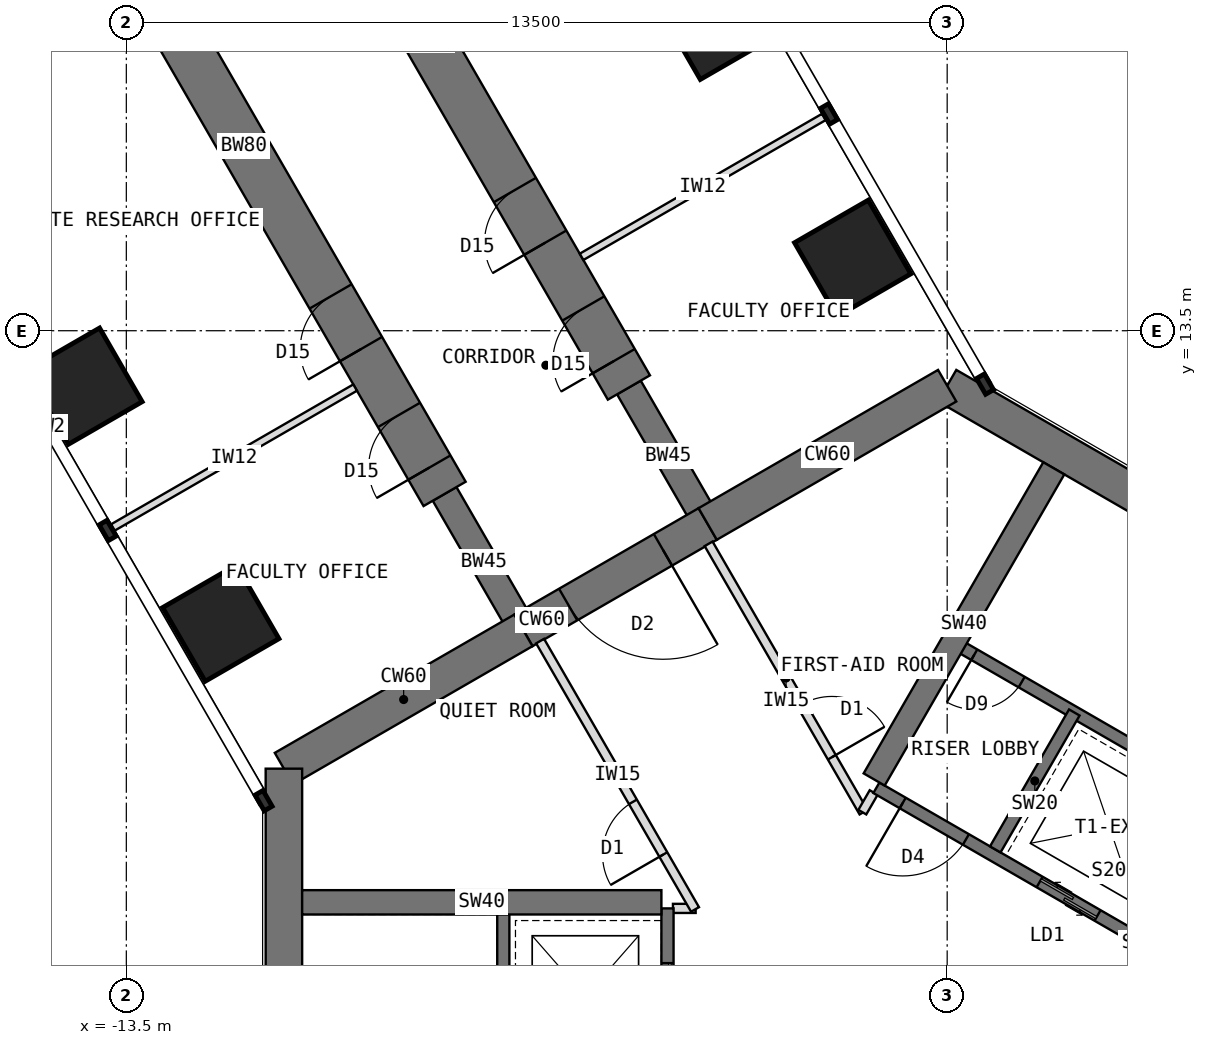
"""IFC4 building model, lengths in metres.
Left out: names, types, materials, properties, quantities, classifications, styles, units other than length and angle.
Written with IfcOpenShell. Run it as: python <this file> out.ifc"""

import sys

from ifc_helpers import new_model, si_unit, direction, frame, frame_2d, origin, origin_2d, place, context, subcontext, project, spatial, rectangle, extrude, element, fill, save


model = new_model("IFC4")
c1 = context("Model", 3, precision=1e-05, world=origin(), true_north=direction((0.0, 1.0)))
c2 = subcontext(c1, "Body", "Model", "MODEL_VIEW")
j1 = project(units=[si_unit("LENGTHUNIT", "METRE"), si_unit("PLANEANGLEUNIT", "RADIAN")], contexts=[c1])
p1 = place(None, origin())
s1 = spatial("IfcSite", under=j1, at=p1, CompositionType="ELEMENT")
p2 = place(p1, origin())
s2 = spatial("IfcBuilding", under=s1, at=p2, CompositionType="ELEMENT")
p3 = place(p2, frame((0.0, 0.0, 97.5)))
s3 = spatial("IfcBuildingStorey", under=s2, at=p3, CompositionType="ELEMENT", Elevation=97.5)
p4 = place(p3, frame((10.908, 6.298, 0.0), z_axis=(0.0, 0.0, 1.0), x_axis=(-0.866021940709, 0.500005998175, 0.0)))
e1 = element("IfcWall", 1, at=p4, inside=s3, PredefinedType="SHEAR", context=c2, shape_type="SweptSolid", body=[
    extrude(rectangle(XDim=12.596, YDim=0.6, at=frame_2d((6.298, 0.0))), origin(), (0.0, 0.0, 1.0), 4.0),
])
p5 = place(p3, frame((0.0, 12.596, 0.0), z_axis=(0.0, 0.0, 1.0), x_axis=(-0.866011268655, -0.500024481964, 0.0)))
e2 = element("IfcWall", 2, at=p5, inside=s3, PredefinedType="SHEAR", context=c2, shape_type="SweptSolid", body=[
    extrude(rectangle(XDim=4.548, YDim=0.6, at=frame_2d((2.274, 0.0))), origin(), (0.0, 0.0, 1.0), 4.0),
])
p6 = place(p3, frame((-3.939, 10.322, 0.0), z_axis=(0.0, 0.0, 1.0), x_axis=(-0.866019471182, -0.500010275428, 0.0)))
e3 = element("IfcWall", 3, at=p6, inside=s3, PredefinedType="SHEAR", context=c2, shape_type="SweptSolid", body=[
    extrude(rectangle(XDim=3.5, YDim=0.6, at=frame_2d((1.75, 0.0))), origin(), (0.0, 0.0, 1.0), 4.0),
])
p7 = place(p6, frame((0.85, 0.0, 0.0)))
e4 = element("IfcOpeningElement", 4, at=p7, cuts=e3, PredefinedType="OPENING", context=c2, shape_type="SweptSolid", body=[
    extrude(rectangle(XDim=1.8, YDim=2.1, at=frame_2d((0.9, 1.05))), frame((0.0, 0.31, 0.0), z_axis=(0.0, -1.0, 0.0), x_axis=(1.0, 0.0, 0.0)), (0.0, 0.0, 1.0), 0.62),
])
p8 = place(p3, frame((-6.97, 8.572, 0.0), z_axis=(0.0, 0.0, 1.0), x_axis=(-0.866034513004, -0.499984222037, 0.0)))
e5 = element("IfcWall", 5, at=p8, inside=s3, PredefinedType="SHEAR", context=c2, shape_type="SweptSolid", body=[
    extrude(rectangle(XDim=4.548, YDim=0.6, at=frame_2d((2.274, 0.0))), origin(), (0.0, 0.0, 1.0), 4.0),
])
p9 = place(p3, frame((-10.908, 6.298, 0.0), z_axis=(0.0, 0.0, 1.0), x_axis=(0.0, -1.0, 0.0)))
e6 = element("IfcWall", 6, at=p9, inside=s3, PredefinedType="SHEAR", context=c2, shape_type="SweptSolid", body=[
    extrude(rectangle(XDim=12.596, YDim=0.6, at=frame_2d((6.298, 0.0))), origin(), (0.0, 0.0, 1.0), 4.0),
])
p10 = place(p3, frame((-6.97, 8.572, 0.0), z_axis=(0.0, 0.0, 1.0), x_axis=(-0.499988811324, 0.866031863473, 0.0)))
e7 = element("IfcWall", 7, at=p10, inside=s3, PredefinedType="SHEAR", context=c2, shape_type="SweptSolid", body=[
    extrude(rectangle(XDim=2.592, YDim=0.45, at=frame_2d((1.296, 0.0))), origin(), (0.0, 0.0, 1.0), 4.0),
])
p11 = place(p3, frame((-8.266, 10.816, 0.0), z_axis=(0.0, 0.0, 1.0), x_axis=(-0.499996231654, 0.866027579429, 0.0)))
e8 = element("IfcWall", 8, at=p11, inside=s3, PredefinedType="SHEAR", context=c2, shape_type="SweptSolid", body=[
    extrude(rectangle(XDim=13.2, YDim=0.8, at=frame_2d((6.6, 0.0))), origin(), (0.0, 0.0, 1.0), 4.0),
])
p12 = place(p11, frame((0.5, 0.0, 0.0)))
e9 = element("IfcOpeningElement", 9, at=p12, cuts=e8, PredefinedType="OPENING", context=c2, shape_type="SweptSolid", body=[
    extrude(rectangle(XDim=1.0, YDim=2.1, at=frame_2d((0.5, 1.05))), frame((0.0, 0.41, 0.0), z_axis=(0.0, -1.0, 0.0), x_axis=(1.0, 0.0, 0.0)), (0.0, 0.0, 1.0), 0.82),
])
p13 = place(p11, frame((2.75, 0.0, 0.0)))
e10 = element("IfcOpeningElement", 10, at=p13, cuts=e8, PredefinedType="OPENING", context=c2, shape_type="SweptSolid", body=[
    extrude(rectangle(XDim=1.0, YDim=2.1, at=frame_2d((0.5, 1.05))), frame((0.0, 0.41, 0.0), z_axis=(0.0, -1.0, 0.0), x_axis=(1.0, 0.0, 0.0)), (0.0, 0.0, 1.0), 0.82),
])
p14 = place(p3, frame((-3.939, 10.322, 0.0), z_axis=(0.0, 0.0, 1.0), x_axis=(-0.499918158782, 0.866072649678, 0.0)))
e11 = element("IfcWall", 11, at=p14, inside=s3, PredefinedType="SHEAR", context=c2, shape_type="SweptSolid", body=[
    extrude(rectangle(XDim=2.592, YDim=0.45, at=frame_2d((1.296, 0.0))), origin(), (0.0, 0.0, 1.0), 4.0),
])
p15 = place(p3, frame((-5.234, 12.566, 0.0), z_axis=(0.0, 0.0, 1.0), x_axis=(-0.500010103361, 0.866019570528, 0.0)))
e12 = element("IfcWall", 12, at=p15, inside=s3, PredefinedType="SHEAR", context=c2, shape_type="SweptSolid", body=[
    extrude(rectangle(XDim=13.2, YDim=0.8, at=frame_2d((6.6, 0.0))), origin(), (0.0, 0.0, 1.0), 4.0),
])
p16 = place(p15, frame((0.5, 0.0, 0.0)))
e13 = element("IfcOpeningElement", 13, at=p16, cuts=e12, PredefinedType="OPENING", context=c2, shape_type="SweptSolid", body=[
    extrude(rectangle(XDim=1.0, YDim=2.1, at=frame_2d((0.5, 1.05))), frame((0.0, 0.41, 0.0), z_axis=(0.0, -1.0, 0.0), x_axis=(1.0, 0.0, 0.0)), (0.0, 0.0, 1.0), 0.82),
])
p17 = place(p15, frame((2.75, 0.0, 0.0)))
e14 = element("IfcOpeningElement", 14, at=p17, cuts=e12, PredefinedType="OPENING", context=c2, shape_type="SweptSolid", body=[
    extrude(rectangle(XDim=1.0, YDim=2.1, at=frame_2d((0.5, 1.05))), frame((0.0, 0.41, 0.0), z_axis=(0.0, -1.0, 0.0), x_axis=(1.0, 0.0, 0.0)), (0.0, 0.0, 1.0), 0.82),
])
for number, where, z_axis, x_axis in (
    (15, (-11.946, 8.691, 0.0), (0.0, 0.0, 1.0), (0.866, 0.5, 0.0)),
    (16, (-1.554, 14.691, 0.0), (0.0, 0.0, 1.0), (0.866, 0.5, 0.0)),
    (17, (-14.196, 12.588, 0.0), (0.0, 0.0, 1.0), (0.866, 0.5, 0.0)),
    (18, (-3.804, 18.588, 0.0), (0.0, 0.0, 1.0), (0.866, 0.5, 0.0)),
):
    element("IfcColumn", number, at=place(p3, frame(where, z_axis=z_axis, x_axis=x_axis)), inside=s3, PredefinedType="COLUMN", context=c2, shape_type="SweptSolid", body=[
        extrude(rectangle(XDim=1.4, YDim=1.4, at=origin_2d()), origin(), (0.0, 0.0, 1.0), 4.0),
    ])
p18 = place(p3, frame((5.764, 1.984, 0.0), z_axis=(0.0, 0.0, 1.0), x_axis=(-0.866026010844, 0.49999894854, 0.0)))
e19 = element("IfcWall", 19, at=p18, inside=s3, PredefinedType="SHEAR", context=c2, shape_type="SweptSolid", body=[
    extrude(rectangle(XDim=8.0, YDim=0.2, at=frame_2d((4.0, 0.0))), origin(), (0.0, 0.0, 1.0), 4.0),
])
p19 = place(p18, frame((6.3, 0.0, 0.0)))
e20 = element("IfcOpeningElement", 20, at=p19, cuts=e19, PredefinedType="OPENING", context=c2, shape_type="SweptSolid", body=[
    extrude(rectangle(XDim=1.2, YDim=2.1, at=frame_2d((0.6, 1.05))), frame((0.0, 0.11, 0.0), z_axis=(0.0, -1.0, 0.0), x_axis=(1.0, 0.0, 0.0)), (0.0, 0.0, 1.0), 0.22),
])
p20 = place(p18, frame((0.9, 0.0, 0.0)))
e21 = element("IfcOpeningElement", 21, at=p20, cuts=e19, PredefinedType="OPENING", context=c2, shape_type="SweptSolid", body=[
    extrude(rectangle(XDim=1.1, YDim=2.2, at=frame_2d((0.55, 1.1))), frame((0.0, 0.11, 0.0), z_axis=(0.0, -1.0, 0.0), x_axis=(1.0, 0.0, 0.0)), (0.0, 0.0, 1.0), 0.22),
])
p21 = place(p18, frame((3.8, 0.0, 0.0)))
e22 = element("IfcOpeningElement", 22, at=p21, cuts=e19, PredefinedType="OPENING", context=c2, shape_type="SweptSolid", body=[
    extrude(rectangle(XDim=1.1, YDim=2.2, at=frame_2d((0.55, 1.1))), frame((0.0, 0.11, 0.0), z_axis=(0.0, -1.0, 0.0), x_axis=(1.0, 0.0, 0.0)), (0.0, 0.0, 1.0), 0.22),
])
p22 = place(p3, frame((0.791, 4.97, 0.0), z_axis=(0.0, 0.0, 1.0), x_axis=(0.499936506574, 0.866062058628, 0.0)))
e23 = element("IfcWall", 23, at=p22, inside=s3, PredefinedType="SHEAR", context=c2, shape_type="SweptSolid", body=[
    extrude(rectangle(XDim=2.6, YDim=0.2, at=frame_2d((1.3, 0.0))), origin(), (0.0, 0.0, 1.0), 4.0),
])
p23 = place(p3, frame((7.114, 4.322, 0.0), z_axis=(0.0, 0.0, 1.0), x_axis=(-0.866026010844, 0.49999894854, 0.0)))
e24 = element("IfcWall", 24, at=p23, inside=s3, PredefinedType="SHEAR", context=c2, shape_type="SweptSolid", body=[
    extrude(rectangle(XDim=8.0, YDim=0.2, at=frame_2d((4.0, 0.0))), origin(), (0.0, 0.0, 1.0), 4.0),
])
p24 = place(p23, frame((6.8, 0.0, 0.0)))
e25 = element("IfcOpeningElement", 25, at=p24, cuts=e24, PredefinedType="OPENING", context=c2, shape_type="SweptSolid", body=[
    extrude(rectangle(XDim=0.9, YDim=2.1, at=frame_2d((0.45, 1.05))), frame((0.0, 0.11, 0.0), z_axis=(0.0, -1.0, 0.0), x_axis=(1.0, 0.0, 0.0)), (0.0, 0.0, 1.0), 0.22),
])
p25 = place(p3, frame((-1.201, 6.12, 0.0), z_axis=(0.0, 0.0, 1.0), x_axis=(0.49999668571, 0.866027317282, 0.0)))
e26 = element("IfcWall", 26, at=p25, inside=s3, PredefinedType="SHEAR", context=c2, shape_type="SweptSolid", body=[
    extrude(rectangle(XDim=5.908, YDim=0.4, at=frame_2d((2.954, 0.0))), origin(), (0.0, 0.0, 1.0), 4.0),
])
p26 = place(p3, frame((-4.6, 4.0, 0.0), z_axis=(0.0, 0.0, 1.0), x_axis=(0.0, -1.0, 0.0)))
e27 = element("IfcWall", 27, at=p26, inside=s3, PredefinedType="SHEAR", context=c2, shape_type="SweptSolid", body=[
    extrude(rectangle(XDim=8.0, YDim=0.2, at=frame_2d((4.0, 0.0))), origin(), (0.0, 0.0, 1.0), 4.0),
])
p27 = place(p26, frame((6.3, 0.0, 0.0)))
e28 = element("IfcOpeningElement", 28, at=p27, cuts=e27, PredefinedType="OPENING", context=c2, shape_type="SweptSolid", body=[
    extrude(rectangle(XDim=1.2, YDim=2.1, at=frame_2d((0.6, 1.05))), frame((0.0, 0.11, 0.0), z_axis=(0.0, -1.0, 0.0), x_axis=(1.0, 0.0, 0.0)), (0.0, 0.0, 1.0), 0.22),
])
p28 = place(p26, frame((0.9, 0.0, 0.0)))
e29 = element("IfcOpeningElement", 29, at=p28, cuts=e27, PredefinedType="OPENING", context=c2, shape_type="SweptSolid", body=[
    extrude(rectangle(XDim=1.1, YDim=2.2, at=frame_2d((0.55, 1.1))), frame((0.0, 0.11, 0.0), z_axis=(0.0, -1.0, 0.0), x_axis=(1.0, 0.0, 0.0)), (0.0, 0.0, 1.0), 0.22),
])
p29 = place(p3, frame((-7.3, 4.0, 0.0), z_axis=(0.0, 0.0, 1.0), x_axis=(0.0, -1.0, 0.0)))
e30 = element("IfcWall", 30, at=p29, inside=s3, PredefinedType="SHEAR", context=c2, shape_type="SweptSolid", body=[
    extrude(rectangle(XDim=8.0, YDim=0.2, at=frame_2d((4.0, 0.0))), origin(), (0.0, 0.0, 1.0), 4.0),
])
p30 = place(p29, frame((6.7, 0.0, 0.0)))
e31 = element("IfcOpeningElement", 31, at=p30, cuts=e30, PredefinedType="OPENING", context=c2, shape_type="SweptSolid", body=[
    extrude(rectangle(XDim=1.1, YDim=2.1, at=frame_2d((0.55, 1.05))), frame((0.0, 0.11, 0.0), z_axis=(0.0, -1.0, 0.0), x_axis=(1.0, 0.0, 0.0)), (0.0, 0.0, 1.0), 0.22),
])
p31 = place(p3, frame((-4.7, 4.1, 0.0), z_axis=(0.0, 0.0, 1.0), x_axis=(-1.0, 0.0, 0.0)))
e32 = element("IfcWall", 32, at=p31, inside=s3, PredefinedType="SHEAR", context=c2, shape_type="SweptSolid", body=[
    extrude(rectangle(XDim=5.908, YDim=0.4, at=frame_2d((2.954, 0.0))), origin(), (0.0, 0.0, 1.0), 4.0),
])
for number, where, z_axis, x_axis in (
    (33, (-9.737, 12.565, 0.0), (0.0, 0.0, 1.0), (-0.866, -0.5, 0.0)),
    (34, (-6.013, 14.715, 0.0), (0.0, 0.0, 1.0), (0.866, 0.5, 0.0)),
):
    element("IfcWall", number, at=place(p3, frame(where, z_axis=z_axis, x_axis=x_axis)), inside=s3, PredefinedType="PARTITIONING", context=c2, shape_type="SweptSolid", body=[
        extrude(rectangle(XDim=4.6, YDim=0.12, at=frame_2d((2.3, 0.0))), origin(), (0.0, 0.0, 1.0), 3.8),
    ])
p32 = place(p3, frame((-4.51, 4.0, 0.0), z_axis=(0.0, 0.0, 1.0), x_axis=(1.0, 0.0, 0.0)))
e35 = element("IfcWall", 35, at=p32, inside=s3, PredefinedType="PARTITIONING", context=c2, shape_type="SweptSolid", body=[
    extrude(rectangle(XDim=0.373, YDim=0.15, at=frame_2d((0.187, 0.0))), origin(), (0.0, 0.0, 1.0), 3.8),
])
p33 = place(p3, frame((-4.147, 3.983, 0.0), z_axis=(0.0, 0.0, 1.0), x_axis=(-0.499993407537, 0.866029209911, 0.0)))
e36 = element("IfcWall", 36, at=p33, inside=s3, PredefinedType="PARTITIONING", context=c2, shape_type="SweptSolid", body=[
    extrude(rectangle(XDim=5.096, YDim=0.15, at=frame_2d((2.548, 0.0))), origin(), (0.0, 0.0, 1.0), 3.8),
])
p34 = place(p33, frame((1.043, 0.0, 0.0)))
e37 = element("IfcOpeningElement", 37, at=p34, cuts=e36, PredefinedType="OPENING", context=c2, shape_type="SweptSolid", body=[
    extrude(rectangle(XDim=1.0, YDim=2.1, at=frame_2d((0.5, 1.05))), frame((0.0, 0.085, 0.0), z_axis=(0.0, -1.0, 0.0), x_axis=(1.0, 0.0, 0.0)), (0.0, 0.0, 1.0), 0.17),
])
p35 = place(p3, frame((-3.924, 9.996, 0.0), z_axis=(0.0, 0.0, 1.0), x_axis=(0.500050086259, -0.865996484538, 0.0)))
e38 = element("IfcWall", 38, at=p35, inside=s3, PredefinedType="PARTITIONING", context=c2, shape_type="SweptSolid", body=[
    extrude(rectangle(XDim=5.096, YDim=0.15, at=frame_2d((2.548, 0.0))), origin(), (0.0, 0.0, 1.0), 3.8),
])
p36 = place(p35, frame((3.053, 0.0, 0.0)))
e39 = element("IfcOpeningElement", 39, at=p36, cuts=e38, PredefinedType="OPENING", context=c2, shape_type="SweptSolid", body=[
    extrude(rectangle(XDim=1.0, YDim=2.1, at=frame_2d((0.5, 1.05))), frame((0.0, 0.085, 0.0), z_axis=(0.0, -1.0, 0.0), x_axis=(1.0, 0.0, 0.0)), (0.0, 0.0, 1.0), 0.17),
])
p37 = place(p3, frame((-1.396, 5.583, 0.0), z_axis=(0.0, 0.0, 1.0), x_axis=(0.500081290722, 0.865978465477, 0.0)))
e40 = element("IfcWall", 40, at=p37, inside=s3, PredefinedType="PARTITIONING", context=c2, shape_type="SweptSolid", body=[
    extrude(rectangle(XDim=0.373, YDim=0.15, at=frame_2d((0.187, 0.0))), origin(), (0.0, 0.0, 1.0), 3.8),
])
p38 = place(p19, origin())
e41 = element("IfcDoor", 41, at=p38, inside=s3, OperationType="SINGLE_SWING_RIGHT", PredefinedType="DOOR", context=c2, shape_type="SweptSolid", body=[
    extrude(rectangle(XDim=1.2, YDim=2.1, at=frame_2d((0.6, 1.05))), frame((0.0, 0.025, 0.0), z_axis=(0.0, -1.0, 0.0), x_axis=(1.0, 0.0, 0.0)), (0.0, 0.0, 1.0), 0.05),
])
fill(e20, e41)
p39 = place(p21, origin())
e42 = element("IfcDoor", 42, at=p39, inside=s3, OperationType="DOUBLE_DOOR_SLIDING", PredefinedType="DOOR", context=c2, shape_type="SweptSolid", body=[
    extrude(rectangle(XDim=1.1, YDim=2.2, at=frame_2d((0.55, 1.1))), frame((0.0, 0.025, 0.0), z_axis=(0.0, -1.0, 0.0), x_axis=(1.0, 0.0, 0.0)), (0.0, 0.0, 1.0), 0.05),
])
fill(e22, e42)
p40 = place(p24, origin())
e43 = element("IfcDoor", 43, at=p40, inside=s3, OperationType="SINGLE_SWING_RIGHT", PredefinedType="DOOR", context=c2, shape_type="SweptSolid", body=[
    extrude(rectangle(XDim=0.9, YDim=2.1, at=frame_2d((0.45, 1.05))), frame((0.0, 0.025, 0.0), z_axis=(0.0, -1.0, 0.0), x_axis=(1.0, 0.0, 0.0)), (0.0, 0.0, 1.0), 0.05),
])
fill(e25, e43)
p41 = place(p28, origin())
e44 = element("IfcDoor", 44, at=p41, inside=s3, OperationType="DOUBLE_DOOR_SLIDING", PredefinedType="DOOR", context=c2, shape_type="SweptSolid", body=[
    extrude(rectangle(XDim=1.1, YDim=2.2, at=frame_2d((0.55, 1.1))), frame((0.0, 0.025, 0.0), z_axis=(0.0, -1.0, 0.0), x_axis=(1.0, 0.0, 0.0)), (0.0, 0.0, 1.0), 0.05),
])
fill(e29, e44)
p42 = place(p7, origin())
e45 = element("IfcDoor", 45, at=p42, inside=s3, OperationType="DOUBLE_DOOR_DOUBLE_SWING", PredefinedType="DOOR", context=c2, shape_type="SweptSolid", body=[
    extrude(rectangle(XDim=1.72, YDim=2.06, at=frame_2d((0.9, 1.03))), frame((0.0, 0.025, 0.0), z_axis=(0.0, -1.0, 0.0), x_axis=(1.0, 0.0, 0.0)), (0.0, 0.0, 1.0), 0.05),
    extrude(rectangle(XDim=0.04, YDim=2.1, at=frame_2d((0.02, 1.05))), frame((0.0, 0.3, 0.0), z_axis=(0.0, -1.0, 0.0), x_axis=(1.0, 0.0, 0.0)), (0.0, 0.0, 1.0), 0.6),
    extrude(rectangle(XDim=0.04, YDim=2.1, at=frame_2d((1.78, 1.05))), frame((0.0, 0.3, 0.0), z_axis=(0.0, -1.0, 0.0), x_axis=(1.0, 0.0, 0.0)), (0.0, 0.0, 1.0), 0.6),
    extrude(rectangle(XDim=1.72, YDim=0.04, at=frame_2d((0.9, 2.08))), frame((0.0, 0.3, 0.0), z_axis=(0.0, -1.0, 0.0), x_axis=(1.0, 0.0, 0.0)), (0.0, 0.0, 1.0), 0.6),
])
fill(e4, e45)
p43 = place(p36, origin())
e46 = element("IfcDoor", 46, at=p43, inside=s3, OperationType="SINGLE_SWING_RIGHT", PredefinedType="DOOR", context=c2, shape_type="SweptSolid", body=[
    extrude(rectangle(XDim=1.0, YDim=2.1, at=frame_2d((0.5, 1.05))), frame((0.0, 0.025, 0.0), z_axis=(0.0, -1.0, 0.0), x_axis=(1.0, 0.0, 0.0)), (0.0, 0.0, 1.0), 0.05),
])
fill(e39, e46)
p44 = place(p34, origin())
e47 = element("IfcDoor", 47, at=p44, inside=s3, OperationType="SINGLE_SWING_LEFT", PredefinedType="DOOR", context=c2, shape_type="SweptSolid", body=[
    extrude(rectangle(XDim=1.0, YDim=2.1, at=frame_2d((0.5, 1.05))), frame((0.0, 0.025, 0.0), z_axis=(0.0, -1.0, 0.0), x_axis=(1.0, 0.0, 0.0)), (0.0, 0.0, 1.0), 0.05),
])
fill(e37, e47)
p45 = place(p12, origin())
e48 = element("IfcDoor", 48, at=p45, inside=s3, OperationType="SINGLE_SWING_LEFT", PredefinedType="DOOR", context=c2, shape_type="SweptSolid", body=[
    extrude(rectangle(XDim=0.92, YDim=2.06, at=frame_2d((0.5, 1.03))), frame((0.0, 0.025, 0.0), z_axis=(0.0, -1.0, 0.0), x_axis=(1.0, 0.0, 0.0)), (0.0, 0.0, 1.0), 0.05),
    extrude(rectangle(XDim=0.04, YDim=2.1, at=frame_2d((0.02, 1.05))), frame((0.0, 0.4, 0.0), z_axis=(0.0, -1.0, 0.0), x_axis=(1.0, 0.0, 0.0)), (0.0, 0.0, 1.0), 0.8),
    extrude(rectangle(XDim=0.04, YDim=2.1, at=frame_2d((0.98, 1.05))), frame((0.0, 0.4, 0.0), z_axis=(0.0, -1.0, 0.0), x_axis=(1.0, 0.0, 0.0)), (0.0, 0.0, 1.0), 0.8),
    extrude(rectangle(XDim=0.92, YDim=0.04, at=frame_2d((0.5, 2.08))), frame((0.0, 0.4, 0.0), z_axis=(0.0, -1.0, 0.0), x_axis=(1.0, 0.0, 0.0)), (0.0, 0.0, 1.0), 0.8),
])
fill(e9, e48)
p46 = place(p13, origin())
e49 = element("IfcDoor", 49, at=p46, inside=s3, OperationType="SINGLE_SWING_LEFT", PredefinedType="DOOR", context=c2, shape_type="SweptSolid", body=[
    extrude(rectangle(XDim=0.92, YDim=2.06, at=frame_2d((0.5, 1.03))), frame((0.0, 0.025, 0.0), z_axis=(0.0, -1.0, 0.0), x_axis=(1.0, 0.0, 0.0)), (0.0, 0.0, 1.0), 0.05),
    extrude(rectangle(XDim=0.04, YDim=2.1, at=frame_2d((0.02, 1.05))), frame((0.0, 0.4, 0.0), z_axis=(0.0, -1.0, 0.0), x_axis=(1.0, 0.0, 0.0)), (0.0, 0.0, 1.0), 0.8),
    extrude(rectangle(XDim=0.04, YDim=2.1, at=frame_2d((0.98, 1.05))), frame((0.0, 0.4, 0.0), z_axis=(0.0, -1.0, 0.0), x_axis=(1.0, 0.0, 0.0)), (0.0, 0.0, 1.0), 0.8),
    extrude(rectangle(XDim=0.92, YDim=0.04, at=frame_2d((0.5, 2.08))), frame((0.0, 0.4, 0.0), z_axis=(0.0, -1.0, 0.0), x_axis=(1.0, 0.0, 0.0)), (0.0, 0.0, 1.0), 0.8),
])
fill(e10, e49)
p47 = place(p16, origin())
e50 = element("IfcDoor", 50, at=p47, inside=s3, OperationType="SINGLE_SWING_LEFT", PredefinedType="DOOR", context=c2, shape_type="SweptSolid", body=[
    extrude(rectangle(XDim=0.92, YDim=2.06, at=frame_2d((0.5, 1.03))), frame((0.0, 0.025, 0.0), z_axis=(0.0, -1.0, 0.0), x_axis=(1.0, 0.0, 0.0)), (0.0, 0.0, 1.0), 0.05),
    extrude(rectangle(XDim=0.04, YDim=2.1, at=frame_2d((0.02, 1.05))), frame((0.0, 0.4, 0.0), z_axis=(0.0, -1.0, 0.0), x_axis=(1.0, 0.0, 0.0)), (0.0, 0.0, 1.0), 0.8),
    extrude(rectangle(XDim=0.04, YDim=2.1, at=frame_2d((0.98, 1.05))), frame((0.0, 0.4, 0.0), z_axis=(0.0, -1.0, 0.0), x_axis=(1.0, 0.0, 0.0)), (0.0, 0.0, 1.0), 0.8),
    extrude(rectangle(XDim=0.92, YDim=0.04, at=frame_2d((0.5, 2.08))), frame((0.0, 0.4, 0.0), z_axis=(0.0, -1.0, 0.0), x_axis=(1.0, 0.0, 0.0)), (0.0, 0.0, 1.0), 0.8),
])
fill(e13, e50)
p48 = place(p17, origin())
e51 = element("IfcDoor", 51, at=p48, inside=s3, OperationType="SINGLE_SWING_LEFT", PredefinedType="DOOR", context=c2, shape_type="SweptSolid", body=[
    extrude(rectangle(XDim=0.92, YDim=2.06, at=frame_2d((0.5, 1.03))), frame((0.0, 0.025, 0.0), z_axis=(0.0, -1.0, 0.0), x_axis=(1.0, 0.0, 0.0)), (0.0, 0.0, 1.0), 0.05),
    extrude(rectangle(XDim=0.04, YDim=2.1, at=frame_2d((0.02, 1.05))), frame((0.0, 0.4, 0.0), z_axis=(0.0, -1.0, 0.0), x_axis=(1.0, 0.0, 0.0)), (0.0, 0.0, 1.0), 0.8),
    extrude(rectangle(XDim=0.04, YDim=2.1, at=frame_2d((0.98, 1.05))), frame((0.0, 0.4, 0.0), z_axis=(0.0, -1.0, 0.0), x_axis=(1.0, 0.0, 0.0)), (0.0, 0.0, 1.0), 0.8),
    extrude(rectangle(XDim=0.92, YDim=0.04, at=frame_2d((0.5, 2.08))), frame((0.0, 0.4, 0.0), z_axis=(0.0, -1.0, 0.0), x_axis=(1.0, 0.0, 0.0)), (0.0, 0.0, 1.0), 0.8),
])
fill(e14, e51)
save(model, sys.argv[1])
